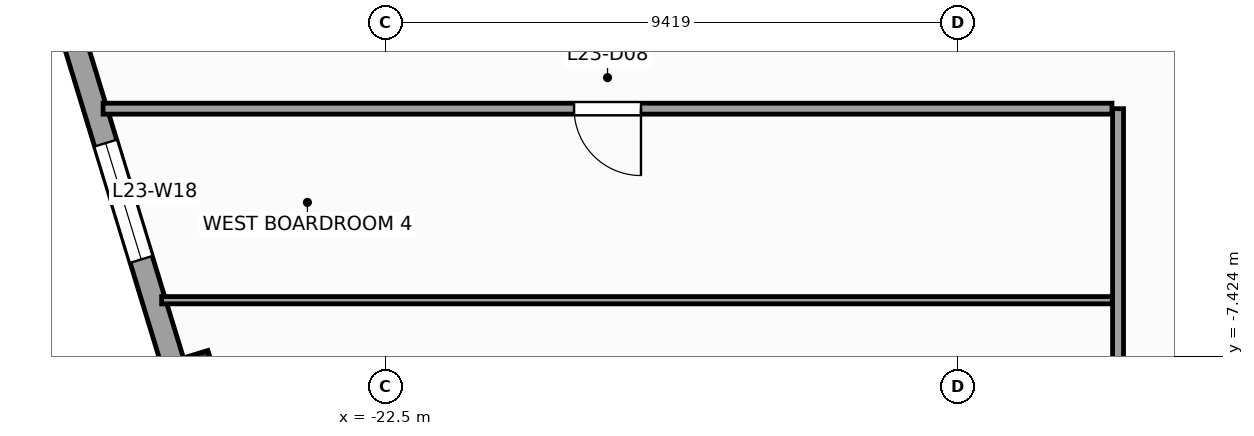
"""IFC4 building model, lengths in metres.
Left out: names, types, materials, properties, quantities, classifications, styles, units other than length and angle.
Written with IfcOpenShell. Run it as: python <this file> out.ifc"""

import sys

from ifc_helpers import new_model, si_unit, direction, frame, frame_2d, origin, origin_2d, place, context, subcontext, project, spatial, rectangle, extrude, source, transform, mapped, element, fill, save


model = new_model("IFC4")
c1 = context("Model", 3, precision=1e-05, world=origin(), true_north=direction((0.0, 1.0)))
c2 = subcontext(c1, "Body", "Model", "MODEL_VIEW")
j1 = project(units=[si_unit("LENGTHUNIT", "METRE"), si_unit("PLANEANGLEUNIT", "RADIAN")], contexts=[c1])
p1 = place(None, origin())
s1 = spatial("IfcSite", under=j1, at=p1, CompositionType="ELEMENT")
p2 = place(p1, origin())
s2 = spatial("IfcBuilding", under=s1, at=p2, CompositionType="ELEMENT")
p3 = place(p2, frame((0.0, 0.0, 99.2)))
s3 = spatial("IfcBuildingStorey", under=s2, at=p3, CompositionType="ELEMENT", Elevation=99.2)
m1 = source(origin(), c2, "Body", "SweptSolid", [
    extrude(rectangle(XDim=0.75, YDim=0.85, at=origin_2d()), origin(), (0.0, 0.0, 1.0), 4.0),
])
p4 = place(p3, frame((-25.653, -7.843, 0.0), z_axis=(0.0, 0.0, 1.0), x_axis=(0.956304755963, 0.292371704723, 0.0)))
e1 = element("IfcColumn", 1, at=p4, inside=s3, PredefinedType="COLUMN", context=c2, shape_type="MappedRepresentation", body=[
    mapped(m1, transform((0.0, 0.0, 0.0), scale=1.0)),
])
p5 = place(p3, frame((-32.658, 14.265, 0.0), z_axis=(0.0, 0.0, 1.0), x_axis=(0.292373127906, -0.956304320851, 0.0)))
e2 = element("IfcWall", 2, at=p5, inside=s3, PredefinedType="STANDARD", context=c2, shape_type="SweptSolid", body=[
    extrude(rectangle(XDim=46.38, YDim=0.38, at=frame_2d((23.19, 0.0))), origin(), (0.0, 0.0, 1.0), 3.14),
])
p6 = place(p5, frame((4.865, 0.0, 0.51)))
e3 = element("IfcOpeningElement", 3, at=p6, cuts=e2, PredefinedType="OPENING", context=c2, shape_type="SweptSolid", body=[
    extrude(rectangle(XDim=1.4, YDim=2.4, at=frame_2d((0.7, 1.2))), frame((0.0, 0.2, 0.0), z_axis=(0.0, -1.0, 0.0), x_axis=(1.0, 0.0, 0.0)), (0.0, 0.0, 1.0), 0.4),
])
p7 = place(p5, frame((12.45, 0.0, 0.51)))
e4 = element("IfcOpeningElement", 4, at=p7, cuts=e2, PredefinedType="OPENING", context=c2, shape_type="SweptSolid", body=[
    extrude(rectangle(XDim=2.0, YDim=2.4, at=frame_2d((1.0, 1.2))), frame((0.0, 0.2, 0.0), z_axis=(0.0, -1.0, 0.0), x_axis=(1.0, 0.0, 0.0)), (0.0, 0.0, 1.0), 0.4),
])
p8 = place(p5, frame((19.012, 0.0, 0.51)))
e5 = element("IfcOpeningElement", 5, at=p8, cuts=e2, PredefinedType="OPENING", context=c2, shape_type="SweptSolid", body=[
    extrude(rectangle(XDim=2.0, YDim=2.4, at=frame_2d((1.0, 1.2))), frame((0.0, 0.2, 0.0), z_axis=(0.0, -1.0, 0.0), x_axis=(1.0, 0.0, 0.0)), (0.0, 0.0, 1.0), 0.4),
])
p9 = place(p5, frame((30.538, 0.0, 0.51)))
e6 = element("IfcOpeningElement", 6, at=p9, cuts=e2, PredefinedType="OPENING", context=c2, shape_type="SweptSolid", body=[
    extrude(rectangle(XDim=2.0, YDim=2.4, at=frame_2d((1.0, 1.2))), frame((0.0, 0.2, 0.0), z_axis=(0.0, -1.0, 0.0), x_axis=(1.0, 0.0, 0.0)), (0.0, 0.0, 1.0), 0.4),
])
p10 = place(p5, frame((39.187, 0.0, 0.51)))
e7 = element("IfcOpeningElement", 7, at=p10, cuts=e2, PredefinedType="OPENING", context=c2, shape_type="SweptSolid", body=[
    extrude(rectangle(XDim=1.4, YDim=2.4, at=frame_2d((0.7, 1.2))), frame((0.0, 0.2, 0.0), z_axis=(0.0, -1.0, 0.0), x_axis=(1.0, 0.0, 0.0)), (0.0, 0.0, 1.0), 0.4),
])
p11 = place(p3, frame((-10.45, -10.45, 0.0), z_axis=(0.0, 0.0, 1.0), x_axis=(0.0, 1.0, 0.0)))
e8 = element("IfcWall", 8, at=p11, inside=s3, PredefinedType="PARTITIONING", context=c2, shape_type="SweptSolid", body=[
    extrude(rectangle(XDim=7.1, YDim=0.18, at=frame_2d((3.55, 0.0))), origin(), (0.0, 0.0, 1.0), 3.74),
])
p12 = place(p3, frame((-27.142, -3.35, 0.0), z_axis=(0.0, 0.0, 1.0), x_axis=(1.0, 0.0, 0.0)))
e9 = element("IfcWall", 9, at=p12, inside=s3, PredefinedType="PARTITIONING", context=c2, shape_type="SweptSolid", body=[
    extrude(rectangle(XDim=16.592, YDim=0.18, at=frame_2d((8.296, 0.0))), origin(), (0.0, 0.0, 1.0), 3.74),
])
p13 = place(p12, frame((7.746, 0.0, 0.0)))
e10 = element("IfcOpeningElement", 10, at=p13, cuts=e9, PredefinedType="OPENING", context=c2, shape_type="SweptSolid", body=[
    extrude(rectangle(XDim=1.1, YDim=2.2, at=frame_2d((0.55, 1.1))), frame((0.0, 0.1, 0.0), z_axis=(0.0, -1.0, 0.0), x_axis=(1.0, 0.0, 0.0)), (0.0, 0.0, 1.0), 0.2),
])
p14 = place(p3, frame((-26.178, -6.5, 0.0), z_axis=(0.0, 0.0, 1.0), x_axis=(1.0, 0.0, 0.0)))
e11 = element("IfcWall", 11, at=p14, inside=s3, PredefinedType="PARTITIONING", context=c2, shape_type="SweptSolid", body=[
    extrude(rectangle(XDim=15.634, YDim=0.12, at=frame_2d((7.817, 0.0))), origin(), (0.0, 0.0, 1.0), 3.74),
])
m2 = source(origin(), c2, "Body", "SweptSolid", [
    extrude(rectangle(XDim=2.0, YDim=2.4, at=frame_2d((1.0, 1.2))), frame((0.0, 0.03, 0.0), z_axis=(0.0, -1.0, 0.0), x_axis=(1.0, 0.0, 0.0)), (0.0, 0.0, 1.0), 0.06),
])
p15 = place(p8, origin())
e12 = element("IfcWindow", 12, at=p15, inside=s3, PartitioningType="SINGLE_PANEL", PredefinedType="WINDOW", context=c2, shape_type="MappedRepresentation", body=[
    mapped(m2, transform((0.0, 0.0, 0.0), scale=1.0)),
])
fill(e5, e12)
m3 = source(origin(), c2, "Body", "SweptSolid", [
    extrude(rectangle(XDim=1.1, YDim=2.2, at=frame_2d((0.55, 1.1))), frame((0.0, 0.025, 0.0), z_axis=(0.0, -1.0, 0.0), x_axis=(1.0, 0.0, 0.0)), (0.0, 0.0, 1.0), 0.05),
])
p16 = place(p13, frame((1.1, 0.0, 0.0), z_axis=(0.0, 0.0, 1.0), x_axis=(-1.0, 0.0, 0.0)))
e13 = element("IfcDoor", 13, at=p16, inside=s3, OperationType="SINGLE_SWING_RIGHT", PredefinedType="DOOR", context=c2, shape_type="MappedRepresentation", body=[
    mapped(m3, transform((0.0, 0.0, 0.0), scale=1.0)),
])
fill(e10, e13)
save(model, sys.argv[1])
